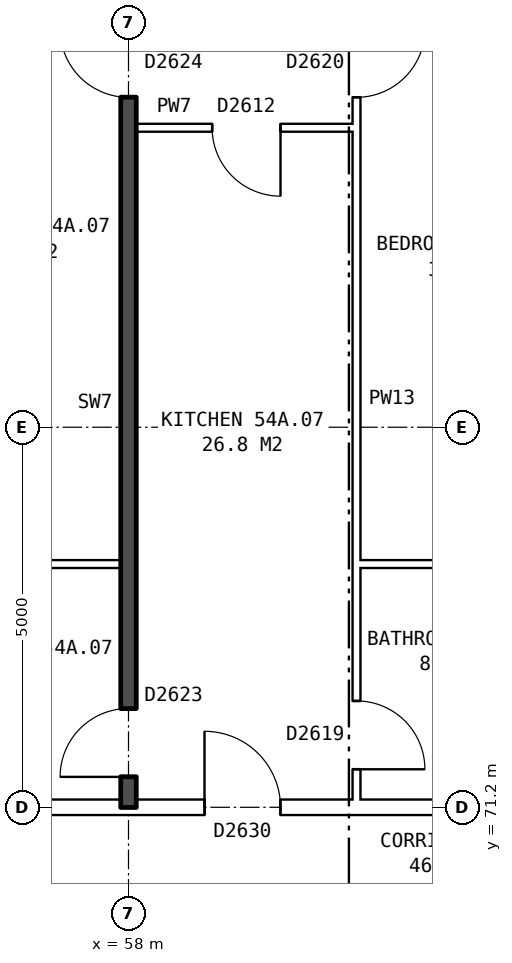
"""IFC4 building model, lengths in metres.
Left out: names, types, materials, properties, quantities, classifications, styles, units other than length and angle.
Written with IfcOpenShell. Run it as: python <this file> out.ifc"""

import sys

from ifc_helpers import new_model, si_unit, direction, frame, frame_2d, origin, place, context, subcontext, project, spatial, rectangle, extrude, element, fill, save


model = new_model("IFC4")
c1 = context("Model", 3, precision=1e-05, world=origin(), true_north=direction((0.0, 1.0)))
c2 = subcontext(c1, "Body", "Model", "MODEL_VIEW")
j1 = project(units=[si_unit("LENGTHUNIT", "METRE"), si_unit("PLANEANGLEUNIT", "RADIAN")], contexts=[c1])
p1 = place(None, origin())
s1 = spatial("IfcSite", under=j1, at=p1, CompositionType="ELEMENT")
p2 = place(p1, origin())
s2 = spatial("IfcBuilding", under=s1, at=p2, CompositionType="ELEMENT")
p3 = place(p2, frame((0.0, 0.0, 191.3)))
s3 = spatial("IfcBuildingStorey", under=s2, at=p3, CompositionType="ELEMENT", Elevation=191.3)
p4 = place(p3, frame((44.36, 71.2, 0.0), z_axis=(0.0, 0.0, 1.0), x_axis=(1.0, 0.0, 0.0)))
e1 = element("IfcWall", 1, at=p4, inside=s3, PredefinedType="PARTITIONING", context=c2, shape_type="SweptSolid", body=[
    extrude(rectangle(XDim=19.28, YDim=0.2, at=frame_2d((9.64, 0.0))), origin(), (0.0, 0.0, 1.0), 2.85),
])
p5 = place(p4, frame((14.64, 0.0, 0.0)))
e2 = element("IfcOpeningElement", 2, at=p5, cuts=e1, PredefinedType="OPENING", context=c2, shape_type="SweptSolid", body=[
    extrude(rectangle(XDim=1.0, YDim=2.1, at=frame_2d((0.5, 1.05))), frame((0.0, 0.11, 0.0), z_axis=(0.0, -1.0, 0.0), x_axis=(1.0, 0.0, 0.0)), (0.0, 0.0, 1.0), 0.22),
])
p6 = place(p4, frame((5.64, 0.0, 0.0)))
e3 = element("IfcOpeningElement", 3, at=p6, cuts=e1, PredefinedType="OPENING", context=c2, shape_type="SweptSolid", body=[
    extrude(rectangle(XDim=1.0, YDim=2.1, at=frame_2d((0.5, 1.05))), frame((0.0, 0.11, 0.0), z_axis=(0.0, -1.0, 0.0), x_axis=(1.0, 0.0, 0.0)), (0.0, 0.0, 1.0), 0.22),
])
p7 = place(p3, frame((52.1, 74.4, 0.0), z_axis=(0.0, 0.0, 1.0), x_axis=(1.0, 0.0, 0.0)))
e4 = element("IfcWall", 4, at=p7, inside=s3, PredefinedType="PARTITIONING", context=c2, shape_type="SweptSolid", body=[
    extrude(rectangle(XDim=5.8, YDim=0.1, at=frame_2d((2.9, 0.0))), origin(), (0.0, 0.0, 1.0), 2.85),
])
p8 = place(p3, frame((61.0, 74.4, 0.0), z_axis=(0.0, 0.0, 1.0), x_axis=(1.0, 0.0, 0.0)))
e5 = element("IfcWall", 5, at=p8, inside=s3, PredefinedType="PARTITIONING", context=c2, shape_type="SweptSolid", body=[
    extrude(rectangle(XDim=2.64, YDim=0.1, at=frame_2d((1.32, 0.0))), origin(), (0.0, 0.0, 1.0), 2.85),
])
p9 = place(p3, frame((58.1, 80.14, 0.0), z_axis=(0.0, 0.0, 1.0), x_axis=(1.0, 0.0, 0.0)))
e6 = element("IfcWall", 6, at=p9, inside=s3, PredefinedType="PARTITIONING", context=c2, shape_type="SweptSolid", body=[
    extrude(rectangle(XDim=2.9, YDim=0.1, at=frame_2d((1.45, 0.0))), origin(), (0.0, 0.0, 1.0), 2.85),
])
p10 = place(p9, frame((1.0, 0.0, 0.0)))
e7 = element("IfcOpeningElement", 7, at=p10, cuts=e6, PredefinedType="OPENING", context=c2, shape_type="SweptSolid", body=[
    extrude(rectangle(XDim=0.9, YDim=2.1, at=frame_2d((0.45, 1.05))), frame((0.0, 0.06, 0.0), z_axis=(0.0, -1.0, 0.0), x_axis=(1.0, 0.0, 0.0)), (0.0, 0.0, 1.0), 0.12),
])
p11 = place(p3, frame((58.0, 71.2, 0.0), z_axis=(0.0, 0.0, 1.0), x_axis=(0.0, 1.0, 0.0)))
e8 = element("IfcWall", 8, at=p11, inside=s3, PredefinedType="SOLIDWALL", context=c2, shape_type="SweptSolid", body=[
    extrude(rectangle(XDim=14.44, YDim=0.2, at=frame_2d((7.22, 0.0))), origin(), (0.0, 0.0, 1.0), 2.85),
])
p12 = place(p11, frame((9.34, 0.0, 0.0)))
e9 = element("IfcOpeningElement", 9, at=p12, cuts=e8, PredefinedType="OPENING", context=c2, shape_type="SweptSolid", body=[
    extrude(rectangle(XDim=0.9, YDim=2.1, at=frame_2d((0.45, 1.05))), frame((0.0, 0.11, 0.0), z_axis=(0.0, -1.0, 0.0), x_axis=(1.0, 0.0, 0.0)), (0.0, 0.0, 1.0), 0.22),
])
p13 = place(p11, frame((0.4, 0.0, 0.0)))
e10 = element("IfcOpeningElement", 10, at=p13, cuts=e8, PredefinedType="OPENING", context=c2, shape_type="SweptSolid", body=[
    extrude(rectangle(XDim=0.9, YDim=2.1, at=frame_2d((0.45, 1.05))), frame((0.0, 0.11, 0.0), z_axis=(0.0, -1.0, 0.0), x_axis=(1.0, 0.0, 0.0)), (0.0, 0.0, 1.0), 0.22),
])
p14 = place(p3, frame((61.0, 71.3, 0.0), z_axis=(0.0, 0.0, 1.0), x_axis=(0.0, 1.0, 0.0)))
e11 = element("IfcWall", 11, at=p14, inside=s3, PredefinedType="PARTITIONING", context=c2, shape_type="SweptSolid", body=[
    extrude(rectangle(XDim=14.34, YDim=0.1, at=frame_2d((7.17, 0.0))), origin(), (0.0, 0.0, 1.0), 2.85),
])
p15 = place(p14, frame((9.24, 0.0, 0.0)))
e12 = element("IfcOpeningElement", 12, at=p15, cuts=e11, PredefinedType="OPENING", context=c2, shape_type="SweptSolid", body=[
    extrude(rectangle(XDim=0.9, YDim=2.1, at=frame_2d((0.45, 1.05))), frame((0.0, 0.06, 0.0), z_axis=(0.0, -1.0, 0.0), x_axis=(1.0, 0.0, 0.0)), (0.0, 0.0, 1.0), 0.12),
])
p16 = place(p14, frame((0.4, 0.0, 0.0)))
e13 = element("IfcOpeningElement", 13, at=p16, cuts=e11, PredefinedType="OPENING", context=c2, shape_type="SweptSolid", body=[
    extrude(rectangle(XDim=0.9, YDim=2.1, at=frame_2d((0.45, 1.05))), frame((0.0, 0.06, 0.0), z_axis=(0.0, -1.0, 0.0), x_axis=(1.0, 0.0, 0.0)), (0.0, 0.0, 1.0), 0.12),
])
p17 = place(p15, frame((0.9, 0.0, 0.0), z_axis=(0.0, 0.0, 1.0), x_axis=(-1.0, 0.0, 0.0)))
e14 = element("IfcDoor", 14, at=p17, inside=s3, OperationType="SINGLE_SWING_LEFT", PredefinedType="DOOR", context=c2, shape_type="SweptSolid", body=[
    extrude(rectangle(XDim=0.9, YDim=2.1, at=frame_2d((0.45, 1.05))), frame((0.0, 0.025, 0.0), z_axis=(0.0, -1.0, 0.0), x_axis=(1.0, 0.0, 0.0)), (0.0, 0.0, 1.0), 0.05),
])
fill(e12, e14)
p18 = place(p12, origin())
e15 = element("IfcDoor", 15, at=p18, inside=s3, OperationType="SINGLE_SWING_RIGHT", PredefinedType="DOOR", context=c2, shape_type="SweptSolid", body=[
    extrude(rectangle(XDim=0.9, YDim=2.1, at=frame_2d((0.45, 1.05))), frame((0.0, 0.025, 0.0), z_axis=(0.0, -1.0, 0.0), x_axis=(1.0, 0.0, 0.0)), (0.0, 0.0, 1.0), 0.05),
])
fill(e9, e15)
p19 = place(p5, origin())
e16 = element("IfcDoor", 16, at=p19, inside=s3, OperationType="SINGLE_SWING_LEFT", PredefinedType="DOOR", context=c2, shape_type="SweptSolid", body=[
    extrude(rectangle(XDim=1.0, YDim=2.1, at=frame_2d((0.5, 1.05))), frame((0.0, 0.025, 0.0), z_axis=(0.0, -1.0, 0.0), x_axis=(1.0, 0.0, 0.0)), (0.0, 0.0, 1.0), 0.05),
])
fill(e2, e16)
p20 = place(p10, frame((0.9, 0.0, 0.0), z_axis=(0.0, 0.0, 1.0), x_axis=(-1.0, 0.0, 0.0)))
e17 = element("IfcDoor", 17, at=p20, inside=s3, OperationType="SINGLE_SWING_LEFT", PredefinedType="DOOR", context=c2, shape_type="SweptSolid", body=[
    extrude(rectangle(XDim=0.9, YDim=2.1, at=frame_2d((0.45, 1.05))), frame((0.0, 0.025, 0.0), z_axis=(0.0, -1.0, 0.0), x_axis=(1.0, 0.0, 0.0)), (0.0, 0.0, 1.0), 0.05),
])
fill(e7, e17)
p21 = place(p16, frame((0.9, 0.0, 0.0), z_axis=(0.0, 0.0, 1.0), x_axis=(-1.0, 0.0, 0.0)))
e18 = element("IfcDoor", 18, at=p21, inside=s3, OperationType="SINGLE_SWING_RIGHT", PredefinedType="DOOR", context=c2, shape_type="SweptSolid", body=[
    extrude(rectangle(XDim=0.9, YDim=2.1, at=frame_2d((0.45, 1.05))), frame((0.0, 0.025, 0.0), z_axis=(0.0, -1.0, 0.0), x_axis=(1.0, 0.0, 0.0)), (0.0, 0.0, 1.0), 0.05),
])
fill(e13, e18)
p22 = place(p13, origin())
e19 = element("IfcDoor", 19, at=p22, inside=s3, OperationType="SINGLE_SWING_LEFT", PredefinedType="DOOR", context=c2, shape_type="SweptSolid", body=[
    extrude(rectangle(XDim=0.9, YDim=2.1, at=frame_2d((0.45, 1.05))), frame((0.0, 0.025, 0.0), z_axis=(0.0, -1.0, 0.0), x_axis=(1.0, 0.0, 0.0)), (0.0, 0.0, 1.0), 0.05),
])
fill(e10, e19)
save(model, sys.argv[1])
